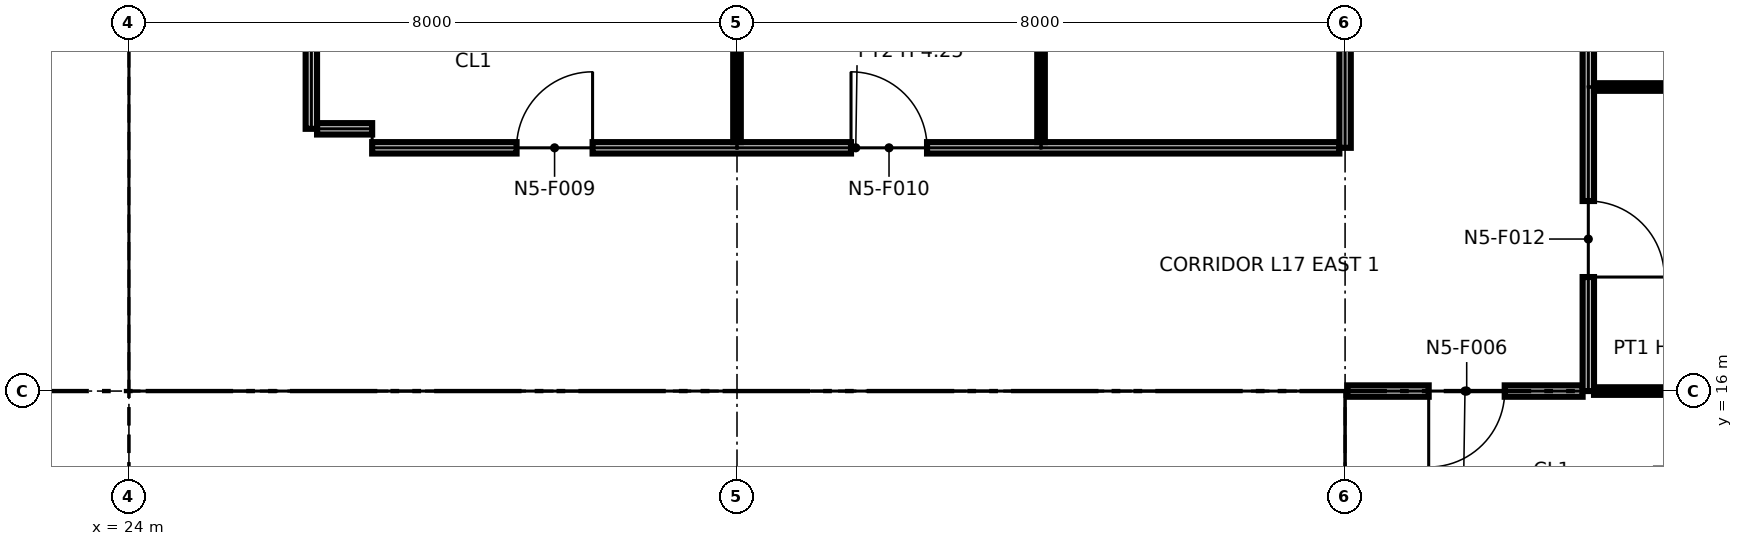
"""IFC4 building model, lengths in metres.
Left out: names, types, materials, properties, quantities, classifications, styles, units other than length and angle.
Written with IfcOpenShell. Run it as: python <this file> out.ifc"""

import sys

from ifc_helpers import new_model, si_unit, direction, frame, frame_2d, origin, origin_2d, place, context, subcontext, project, spatial, polyline, rectangle, i_section, outline, extrude, element, fill, save


model = new_model("IFC4")
c1 = context("Model", 3, precision=1e-05, world=origin(), true_north=direction((0.0, 1.0)))
c2 = subcontext(c1, "Body", "Model", "MODEL_VIEW")
j1 = project(units=[si_unit("LENGTHUNIT", "METRE"), si_unit("PLANEANGLEUNIT", "RADIAN")], contexts=[c1])
p1 = place(None, origin())
s1 = spatial("IfcSite", under=j1, at=p1, CompositionType="ELEMENT")
p2 = place(p1, origin())
s2 = spatial("IfcBuilding", under=s1, at=p2, CompositionType="ELEMENT")
p3 = place(p2, frame((0.0, 0.0, 92.0)))
s3 = spatial("IfcBuildingStorey", under=s2, at=p3, CompositionType="ELEMENT", Elevation=92.0)
p4 = place(p3, frame((24.0, 16.0, 0.0), z_axis=(0.0, 0.0, 1.0), x_axis=(1.0, 0.0, 0.0)))
e1 = element("IfcColumn", 1, at=p4, inside=s3, PredefinedType="COLUMN", context=c2, shape_type="SweptSolid", body=[
    extrude(i_section(OverallWidth=0.411, OverallDepth=0.434, WebThickness=0.036, FlangeThickness=0.057, at=origin_2d()), origin(), (0.0, 0.0, 1.0), 4.25),
])
for number, where, z_axis, x_axis in (
    (2, (32.0, 16.0, 0.0), (0.0, 0.0, 1.0), (1.0, 0.0, 0.0)),
    (3, (40.0, 16.0, 0.0), (0.0, 0.0, 1.0), (1.0, 0.0, 0.0)),
):
    element("IfcColumn", number, at=place(p3, frame(where, z_axis=z_axis, x_axis=x_axis)), inside=s3, PredefinedType="COLUMN", context=c2, shape_type="SweptSolid", body=[
        extrude(i_section(OverallWidth=0.406, OverallDepth=0.417, WebThickness=0.03, FlangeThickness=0.048, at=origin_2d()), origin(), (0.0, 0.0, 1.0), 4.25),
    ])
p5 = place(p3, frame((8.85, 19.9, 0.0), z_axis=(0.0, 0.0, 1.0), x_axis=(1.0, 0.0, 0.0)))
e4 = element("IfcWall", 4, at=p5, inside=s3, PredefinedType="PARTITIONING", context=c2, shape_type="SweptSolid", body=[
    extrude(outline(polyline([(0.0, 0.0), (14.3, 0.0), (14.3, 3.789), (7.27, 3.789), (7.269, 3.632), (7.031, 3.632), (7.031, 4.25), (0.0, 4.25), (0.0, 0.0)])), frame((0.0, 0.1, 0.0), z_axis=(0.0, -1.0, 0.0), x_axis=(1.0, 0.0, 0.0)), (0.0, 0.0, 1.0), 0.2),
])
p6 = place(p5, frame((6.35, 0.0, 0.0)))
e5 = element("IfcOpeningElement", 5, at=p6, cuts=e4, PredefinedType="OPENING", context=c2, shape_type="SweptSolid", body=[
    extrude(rectangle(XDim=0.9, YDim=2.1, at=frame_2d((0.45, 1.05))), frame((0.0, 0.11, 0.0), z_axis=(0.0, -1.0, 0.0), x_axis=(1.0, 0.0, 0.0)), (0.0, 0.0, 1.0), 0.22),
])
p7 = place(p5, frame((9.0, 0.0, 0.0)))
e6 = element("IfcOpeningElement", 6, at=p7, cuts=e4, PredefinedType="OPENING", context=c2, shape_type="SweptSolid", body=[
    extrude(rectangle(XDim=0.9, YDim=2.1, at=frame_2d((0.45, 1.05))), frame((0.0, 0.11, 0.0), z_axis=(0.0, -1.0, 0.0), x_axis=(1.0, 0.0, 0.0)), (0.0, 0.0, 1.0), 0.22),
])
p8 = place(p5, frame((11.35, 0.0, 0.0)))
e7 = element("IfcOpeningElement", 7, at=p8, cuts=e4, PredefinedType="OPENING", context=c2, shape_type="SweptSolid", body=[
    extrude(rectangle(XDim=1.0, YDim=2.1, at=frame_2d((0.5, 1.05))), frame((0.0, 0.11, 0.0), z_axis=(0.0, -1.0, 0.0), x_axis=(1.0, 0.0, 0.0)), (0.0, 0.0, 1.0), 0.22),
])
p9 = place(p5, frame((13.125, 0.0, 0.0)))
e8 = element("IfcOpeningElement", 8, at=p9, cuts=e4, PredefinedType="OPENING", context=c2, shape_type="SweptSolid", body=[
    extrude(rectangle(XDim=0.9, YDim=2.1, at=frame_2d((0.45, 1.05))), frame((0.0, 0.11, 0.0), z_axis=(0.0, -1.0, 0.0), x_axis=(1.0, 0.0, 0.0)), (0.0, 0.0, 1.0), 0.22),
])
p10 = place(p3, frame((16.219, 16.0, 0.0), z_axis=(0.0, 0.0, 1.0), x_axis=(1.0, 0.0, 0.0)))
e9 = element("IfcWall", 9, at=p10, inside=s3, PredefinedType="PARTITIONING", context=c2, shape_type="SweptSolid", body=[
    extrude(rectangle(XDim=6.931, YDim=0.6, at=frame_2d((3.466, 0.0))), origin(), (0.0, 0.0, 1.0), 3.632),
])
p11 = place(p10, frame((6.631, 0.0, 0.0), z_axis=(0.0, 0.0, 1.0), x_axis=(-1.0, 0.0, 0.0)))
e10 = element("IfcOpeningElement", 10, at=p11, cuts=e9, PredefinedType="OPENING", context=c2, shape_type="SweptSolid", body=[
    extrude(rectangle(XDim=0.7, YDim=2.1, at=frame_2d((0.35, 1.05))), frame((0.0, 0.31, 0.0), z_axis=(0.0, -1.0, 0.0), x_axis=(1.0, 0.0, 0.0)), (0.0, 0.0, 1.0), 0.62),
])
p12 = place(p3, frame((23.25, 8.85, 0.0), z_axis=(0.0, 0.0, 1.0), x_axis=(0.0, 1.0, 0.0)))
e11 = element("IfcWall", 11, at=p12, inside=s3, PredefinedType="PARTITIONING", context=c2, shape_type="SweptSolid", body=[
    extrude(outline(polyline([(0.0, 0.0), (14.3, 0.0), (14.3, 4.25), (11.231, 4.25), (11.23, 3.789), (11.07, 3.789), (11.069, 4.25), (7.27, 4.25), (7.269, 3.632), (7.031, 3.632), (7.031, 4.25), (1.231, 4.25), (1.23, 3.789), (1.07, 3.789), (1.069, 4.25), (0.0, 4.25), (0.0, 0.0)])), frame((0.0, 0.1, 0.0), z_axis=(0.0, -1.0, 0.0), x_axis=(1.0, 0.0, 0.0)), (0.0, 0.0, 1.0), 0.2),
])
p13 = place(p12, frame((8.3, 0.0, 0.0)))
e12 = element("IfcOpeningElement", 12, at=p13, cuts=e11, PredefinedType="OPENING", context=c2, shape_type="SweptSolid", body=[
    extrude(rectangle(XDim=1.8, YDim=2.1, at=frame_2d((0.9, 1.05))), frame((0.0, 0.11, 0.0), z_axis=(0.0, -1.0, 0.0), x_axis=(1.0, 0.0, 0.0)), (0.0, 0.0, 1.0), 0.22),
])
p14 = place(p3, frame((24.75, 8.85, 0.0), z_axis=(0.0, 0.0, 1.0), x_axis=(0.0, 1.0, 0.0)))
e13 = element("IfcWall", 13, at=p14, inside=s3, PredefinedType="PARTITIONING", context=c2, shape_type="SweptSolid", body=[
    extrude(outline(polyline([(0.0, 0.0), (6.3, 0.0), (6.3, 4.25), (3.231, 4.25), (3.23, 3.789), (3.07, 3.789), (3.069, 4.25), (0.0, 4.25), (0.0, 0.0)])), frame((0.0, 0.1, 0.0), z_axis=(0.0, -1.0, 0.0), x_axis=(1.0, 0.0, 0.0)), (0.0, 0.0, 1.0), 0.2),
])
p15 = place(p3, frame((24.65, 15.25, 0.0), z_axis=(0.0, 0.0, 1.0), x_axis=(1.0, 0.0, 0.0)))
e14 = element("IfcWall", 14, at=p15, inside=s3, PredefinedType="PARTITIONING", context=c2, shape_type="SweptSolid", body=[
    extrude(outline(polyline([(0.0, 0.0), (14.7, 0.0), (14.7, 4.25), (7.469, 4.25), (7.469, 3.632), (7.231, 3.632), (7.23, 4.25), (0.0, 4.25), (0.0, 0.0)])), frame((0.0, 0.1, 0.0), z_axis=(0.0, -1.0, 0.0), x_axis=(1.0, 0.0, 0.0)), (0.0, 0.0, 1.0), 0.2),
])
p16 = place(p15, frame((2.85, 0.0, 0.0)))
e15 = element("IfcOpeningElement", 15, at=p16, cuts=e14, PredefinedType="OPENING", context=c2, shape_type="SweptSolid", body=[
    extrude(rectangle(XDim=1.8, YDim=2.1, at=frame_2d((0.9, 1.05))), frame((0.0, 0.11, 0.0), z_axis=(0.0, -1.0, 0.0), x_axis=(1.0, 0.0, 0.0)), (0.0, 0.0, 1.0), 0.22),
])
p17 = place(p15, frame((9.95, 0.0, 0.0), z_axis=(0.0, 0.0, 1.0), x_axis=(-1.0, 0.0, 0.0)))
e16 = element("IfcOpeningElement", 16, at=p17, cuts=e14, PredefinedType="OPENING", context=c2, shape_type="SweptSolid", body=[
    extrude(rectangle(XDim=1.4, YDim=2.1, at=frame_2d((0.7, 1.05))), frame((0.0, 0.11, 0.0), z_axis=(0.0, -1.0, 0.0), x_axis=(1.0, 0.0, 0.0)), (0.0, 0.0, 1.0), 0.22),
])
p18 = place(p15, frame((13.4, 0.0, 0.0), z_axis=(0.0, 0.0, 1.0), x_axis=(-1.0, 0.0, 0.0)))
e17 = element("IfcOpeningElement", 17, at=p18, cuts=e14, PredefinedType="OPENING", context=c2, shape_type="SweptSolid", body=[
    extrude(rectangle(XDim=1.4, YDim=2.1, at=frame_2d((0.7, 1.05))), frame((0.0, 0.11, 0.0), z_axis=(0.0, -1.0, 0.0), x_axis=(1.0, 0.0, 0.0)), (0.0, 0.0, 1.0), 0.22),
])
p19 = place(p3, frame((32.0, 13.2, 0.0), z_axis=(0.0, 0.0, 1.0), x_axis=(0.0, 1.0, 0.0)))
e18 = element("IfcWall", 18, at=p19, inside=s3, PredefinedType="PARTITIONING", context=c2, shape_type="SweptSolid", body=[
    extrude(rectangle(XDim=1.95, YDim=0.6, at=frame_2d((0.975, 0.0))), origin(), (0.0, 0.0, 1.0), 3.632),
])
for number, where, z_axis, x_axis in (
    (19, (35.6, 8.85, 0.0), (0.0, 0.0, 1.0), (0.0, 1.0, 0.0)),
    (20, (39.25, 8.85, 0.0), (0.0, 0.0, 1.0), (0.0, 1.0, 0.0)),
):
    element("IfcWall", number, at=place(p3, frame(where, z_axis=z_axis, x_axis=x_axis)), inside=s3, PredefinedType="PARTITIONING", context=c2, shape_type="SweptSolid", body=[
        extrude(rectangle(XDim=6.3, YDim=0.2, at=frame_2d((3.15, 0.0))), origin(), (0.0, 0.0, 1.0), 4.25),
    ])
p20 = place(p3, frame((40.03, 16.0, 0.0), z_axis=(0.0, 0.0, 1.0), x_axis=(1.0, 0.0, 0.0)))
e21 = element("IfcWall", 21, at=p20, inside=s3, PredefinedType="PARTITIONING", context=c2, shape_type="SweptSolid", body=[
    extrude(rectangle(XDim=3.095, YDim=0.15, at=frame_2d((1.547, 0.0))), origin(), (0.0, 0.0, 1.0), 3.47),
])
p21 = place(p20, frame((2.07, 0.0, 0.0), z_axis=(0.0, 0.0, 1.0), x_axis=(-1.0, 0.0, 0.0)))
e22 = element("IfcOpeningElement", 22, at=p21, cuts=e21, PredefinedType="OPENING", context=c2, shape_type="SweptSolid", body=[
    extrude(rectangle(XDim=1.0, YDim=2.1, at=frame_2d((0.5, 1.05))), frame((0.0, 0.085, 0.0), z_axis=(0.0, -1.0, 0.0), x_axis=(1.0, 0.0, 0.0)), (0.0, 0.0, 1.0), 0.17),
])
p22 = place(p3, frame((43.275, 16.0, 0.0), z_axis=(0.0, 0.0, 1.0), x_axis=(1.0, 0.0, 0.0)))
e23 = element("IfcWall", 23, at=p22, inside=s3, PredefinedType="PARTITIONING", context=c2, shape_type="SweptSolid", body=[
    extrude(rectangle(XDim=1.895, YDim=0.1, at=frame_2d((0.948, 0.0))), origin(), (0.0, 0.0, 1.0), 3.47),
])
p23 = place(p3, frame((43.2, 16.0, 0.0), z_axis=(0.0, 0.0, 1.0), x_axis=(0.0, 1.0, 0.0)))
e24 = element("IfcWall", 24, at=p23, inside=s3, PredefinedType="PARTITIONING", context=c2, shape_type="SweptSolid", body=[
    extrude(outline(polyline([(0.0, 0.0), (27.125, 0.0), (27.125, 4.25), (24.3, 4.25), (24.298, 3.47), (23.702, 3.47), (23.7, 4.25), (20.3, 4.25), (20.298, 3.47), (19.702, 3.47), (19.7, 4.25), (16.3, 4.25), (16.298, 3.47), (15.702, 3.47), (15.7, 4.25), (12.3, 4.25), (12.298, 3.47), (11.702, 3.47), (11.7, 4.25), (8.3, 4.25), (8.298, 3.47), (7.702, 3.47), (7.7, 4.25), (4.3, 4.25), (4.298, 3.47), (3.702, 3.47), (3.7, 4.25), (0.0, 4.25), (0.0, 0.0)])), frame((0.0, 0.075, 0.0), z_axis=(0.0, -1.0, 0.0), x_axis=(1.0, 0.0, 0.0)), (0.0, 0.0, 1.0), 0.15),
])
p24 = place(p23, frame((2.5, 0.0, 0.0), z_axis=(0.0, 0.0, 1.0), x_axis=(-1.0, 0.0, 0.0)))
e25 = element("IfcOpeningElement", 25, at=p24, cuts=e24, PredefinedType="OPENING", context=c2, shape_type="SweptSolid", body=[
    extrude(rectangle(XDim=1.0, YDim=2.1, at=frame_2d((0.5, 1.05))), frame((0.0, 0.085, 0.0), z_axis=(0.0, -1.0, 0.0), x_axis=(1.0, 0.0, 0.0)), (0.0, 0.0, 1.0), 0.17),
])
p25 = place(p23, frame((12.5, 0.0, 0.0), z_axis=(0.0, 0.0, 1.0), x_axis=(-1.0, 0.0, 0.0)))
e26 = element("IfcOpeningElement", 26, at=p25, cuts=e24, PredefinedType="OPENING", context=c2, shape_type="SweptSolid", body=[
    extrude(rectangle(XDim=1.0, YDim=2.1, at=frame_2d((0.5, 1.05))), frame((0.0, 0.085, 0.0), z_axis=(0.0, -1.0, 0.0), x_axis=(1.0, 0.0, 0.0)), (0.0, 0.0, 1.0), 0.17),
])
p26 = place(p23, frame((18.5, 0.0, 0.0), z_axis=(0.0, 0.0, 1.0), x_axis=(-1.0, 0.0, 0.0)))
e27 = element("IfcOpeningElement", 27, at=p26, cuts=e24, PredefinedType="OPENING", context=c2, shape_type="SweptSolid", body=[
    extrude(rectangle(XDim=1.0, YDim=2.1, at=frame_2d((0.5, 1.05))), frame((0.0, 0.085, 0.0), z_axis=(0.0, -1.0, 0.0), x_axis=(1.0, 0.0, 0.0)), (0.0, 0.0, 1.0), 0.17),
])
p27 = place(p23, frame((22.5, 0.0, 0.0), z_axis=(0.0, 0.0, 1.0), x_axis=(-1.0, 0.0, 0.0)))
e28 = element("IfcOpeningElement", 28, at=p27, cuts=e24, PredefinedType="OPENING", context=c2, shape_type="SweptSolid", body=[
    extrude(rectangle(XDim=1.0, YDim=2.1, at=frame_2d((0.5, 1.05))), frame((0.0, 0.085, 0.0), z_axis=(0.0, -1.0, 0.0), x_axis=(1.0, 0.0, 0.0)), (0.0, 0.0, 1.0), 0.17),
])
p28 = place(p23, frame((26.1, 0.0, 0.0), z_axis=(0.0, 0.0, 1.0), x_axis=(-1.0, 0.0, 0.0)))
e29 = element("IfcOpeningElement", 29, at=p28, cuts=e24, PredefinedType="OPENING", context=c2, shape_type="SweptSolid", body=[
    extrude(rectangle(XDim=1.0, YDim=2.1, at=frame_2d((0.5, 1.05))), frame((0.0, 0.085, 0.0), z_axis=(0.0, -1.0, 0.0), x_axis=(1.0, 0.0, 0.0)), (0.0, 0.0, 1.0), 0.17),
])
p29 = place(p3, frame((27.2, 19.2, 0.0), z_axis=(0.0, 0.0, 1.0), x_axis=(1.0, 0.0, 0.0)))
e30 = element("IfcWall", 30, at=p29, inside=s3, PredefinedType="PARTITIONING", context=c2, shape_type="SweptSolid", body=[
    extrude(rectangle(XDim=12.725, YDim=0.15, at=frame_2d((6.363, 0.0))), origin(), (0.0, 0.0, 1.0), 4.25),
])
p30 = place(p29, frame((1.9, 0.0, 0.0)))
e31 = element("IfcOpeningElement", 31, at=p30, cuts=e30, PredefinedType="OPENING", context=c2, shape_type="SweptSolid", body=[
    extrude(rectangle(XDim=1.0, YDim=2.1, at=frame_2d((0.5, 1.05))), frame((0.0, 0.085, 0.0), z_axis=(0.0, -1.0, 0.0), x_axis=(1.0, 0.0, 0.0)), (0.0, 0.0, 1.0), 0.17),
])
p31 = place(p29, frame((6.3, 0.0, 0.0)))
e32 = element("IfcOpeningElement", 32, at=p31, cuts=e30, PredefinedType="OPENING", context=c2, shape_type="SweptSolid", body=[
    extrude(rectangle(XDim=1.0, YDim=2.1, at=frame_2d((0.5, 1.05))), frame((0.0, 0.085, 0.0), z_axis=(0.0, -1.0, 0.0), x_axis=(1.0, 0.0, 0.0)), (0.0, 0.0, 1.0), 0.17),
])
p32 = place(p3, frame((32.0, 19.275, 0.0), z_axis=(0.0, 0.0, 1.0), x_axis=(0.0, 1.0, 0.0)))
e33 = element("IfcWall", 33, at=p32, inside=s3, PredefinedType="PARTITIONING", context=c2, shape_type="SweptSolid", body=[
    extrude(rectangle(XDim=4.675, YDim=0.1, at=frame_2d((2.337, 0.0))), origin(), (0.0, 0.0, 1.0), 3.47),
])
p33 = place(p3, frame((36.0, 19.275, 0.0), z_axis=(0.0, 0.0, 1.0), x_axis=(0.0, 1.0, 0.0)))
e34 = element("IfcWall", 34, at=p33, inside=s3, PredefinedType="PARTITIONING", context=c2, shape_type="SweptSolid", body=[
    extrude(outline(polyline([(0.0, 0.0), (4.675, 0.0), (4.675, 4.25), (1.025, 4.25), (1.023, 3.47), (0.427, 3.47), (0.425, 4.25), (0.0, 4.25), (0.0, 0.0)])), frame((0.0, 0.05, 0.0), z_axis=(0.0, -1.0, 0.0), x_axis=(1.0, 0.0, 0.0)), (0.0, 0.0, 1.0), 0.1),
])
p34 = place(p3, frame((40.0, 19.2, 0.0), z_axis=(0.0, 0.0, 1.0), x_axis=(0.0, 1.0, 0.0)))
e35 = element("IfcWall", 35, at=p34, inside=s3, PredefinedType="PARTITIONING", context=c2, shape_type="SweptSolid", body=[
    extrude(rectangle(XDim=12.77, YDim=0.15, at=frame_2d((6.385, 0.0))), origin(), (0.0, 0.0, 1.0), 3.47),
])
p35 = place(p34, frame((1.9, 0.0, 0.0)))
e36 = element("IfcOpeningElement", 36, at=p35, cuts=e35, PredefinedType="OPENING", context=c2, shape_type="SweptSolid", body=[
    extrude(rectangle(XDim=1.0, YDim=2.1, at=frame_2d((0.5, 1.05))), frame((0.0, 0.085, 0.0), z_axis=(0.0, -1.0, 0.0), x_axis=(1.0, 0.0, 0.0)), (0.0, 0.0, 1.0), 0.17),
])
p36 = place(p34, frame((6.3, 0.0, 0.0)))
e37 = element("IfcOpeningElement", 37, at=p36, cuts=e35, PredefinedType="OPENING", context=c2, shape_type="SweptSolid", body=[
    extrude(rectangle(XDim=1.0, YDim=2.1, at=frame_2d((0.5, 1.05))), frame((0.0, 0.085, 0.0), z_axis=(0.0, -1.0, 0.0), x_axis=(1.0, 0.0, 0.0)), (0.0, 0.0, 1.0), 0.17),
])
p37 = place(p34, frame((10.3, 0.0, 0.0)))
e38 = element("IfcOpeningElement", 38, at=p37, cuts=e35, PredefinedType="OPENING", context=c2, shape_type="SweptSolid", body=[
    extrude(rectangle(XDim=1.0, YDim=2.1, at=frame_2d((0.5, 1.05))), frame((0.0, 0.085, 0.0), z_axis=(0.0, -1.0, 0.0), x_axis=(1.0, 0.0, 0.0)), (0.0, 0.0, 1.0), 0.17),
])
p38 = place(p3, frame((26.475, 19.45, 0.0), z_axis=(0.0, 0.0, 1.0), x_axis=(1.0, 0.0, 0.0)))
e39 = element("IfcWall", 39, at=p38, inside=s3, PredefinedType="PARTITIONING", context=c2, shape_type="SweptSolid", body=[
    extrude(rectangle(XDim=0.725, YDim=0.15, at=frame_2d((0.362, 0.0))), origin(), (0.0, 0.0, 1.0), 4.25),
])
p39 = place(p3, frame((26.4, 19.45, 0.0), z_axis=(0.0, 0.0, 1.0), x_axis=(0.0, 1.0, 0.0)))
e40 = element("IfcWall", 40, at=p39, inside=s3, PredefinedType="PARTITIONING", context=c2, shape_type="SweptSolid", body=[
    extrude(outline(polyline([(0.0, 0.0), (12.52, 0.0), (12.52, 4.25), (8.85, 4.25), (8.848, 3.47), (8.252, 3.47), (8.25, 4.25), (4.85, 4.25), (4.848, 3.47), (4.252, 3.47), (4.25, 4.25), (0.85, 4.25), (0.848, 3.47), (0.252, 3.47), (0.25, 4.25), (0.0, 4.25), (0.0, 0.0)])), frame((0.0, 0.075, 0.0), z_axis=(0.0, -1.0, 0.0), x_axis=(1.0, 0.0, 0.0)), (0.0, 0.0, 1.0), 0.15),
])
p40 = place(p39, frame((9.05, 0.0, 0.0), z_axis=(0.0, 0.0, 1.0), x_axis=(-1.0, 0.0, 0.0)))
e41 = element("IfcOpeningElement", 41, at=p40, cuts=e40, PredefinedType="OPENING", context=c2, shape_type="SweptSolid", body=[
    extrude(rectangle(XDim=1.0, YDim=2.1, at=frame_2d((0.5, 1.05))), frame((0.0, 0.085, 0.0), z_axis=(0.0, -1.0, 0.0), x_axis=(1.0, 0.0, 0.0)), (0.0, 0.0, 1.0), 0.17),
])
p41 = place(p3, frame((43.275, 20.0, 0.0), z_axis=(0.0, 0.0, 1.0), x_axis=(1.0, 0.0, 0.0)))
e42 = element("IfcWall", 42, at=p41, inside=s3, PredefinedType="PARTITIONING", context=c2, shape_type="SweptSolid", body=[
    extrude(rectangle(XDim=4.595, YDim=0.1, at=frame_2d((2.298, 0.0))), origin(), (0.0, 0.0, 1.0), 3.47),
])
p42 = place(p13, origin())
e43 = element("IfcDoor", 43, at=p42, inside=s3, OperationType="DOUBLE_DOOR_SINGLE_SWING", PredefinedType="NOTDEFINED", context=c2, shape_type="SweptSolid", body=[
    extrude(rectangle(XDim=1.8, YDim=2.1, at=frame_2d((0.9, 1.05))), frame((0.0, 0.025, 0.0), z_axis=(0.0, -1.0, 0.0), x_axis=(1.0, 0.0, 0.0)), (0.0, 0.0, 1.0), 0.05),
])
fill(e12, e43)
p43 = place(p16, origin())
e44 = element("IfcDoor", 44, at=p43, inside=s3, OperationType="DOUBLE_DOOR_SINGLE_SWING", PredefinedType="NOTDEFINED", context=c2, shape_type="SweptSolid", body=[
    extrude(rectangle(XDim=1.8, YDim=2.1, at=frame_2d((0.9, 1.05))), frame((0.0, 0.025, 0.0), z_axis=(0.0, -1.0, 0.0), x_axis=(1.0, 0.0, 0.0)), (0.0, 0.0, 1.0), 0.05),
])
fill(e15, e44)
p44 = place(p17, origin())
e45 = element("IfcDoor", 45, at=p44, inside=s3, OperationType="DOUBLE_DOOR_SINGLE_SWING", PredefinedType="NOTDEFINED", context=c2, shape_type="SweptSolid", body=[
    extrude(rectangle(XDim=1.4, YDim=2.1, at=frame_2d((0.7, 1.05))), frame((0.0, 0.025, 0.0), z_axis=(0.0, -1.0, 0.0), x_axis=(1.0, 0.0, 0.0)), (0.0, 0.0, 1.0), 0.05),
])
fill(e16, e45)
p45 = place(p18, origin())
e46 = element("IfcDoor", 46, at=p45, inside=s3, OperationType="DOUBLE_DOOR_SINGLE_SWING", PredefinedType="NOTDEFINED", context=c2, shape_type="SweptSolid", body=[
    extrude(rectangle(XDim=1.4, YDim=2.1, at=frame_2d((0.7, 1.05))), frame((0.0, 0.025, 0.0), z_axis=(0.0, -1.0, 0.0), x_axis=(1.0, 0.0, 0.0)), (0.0, 0.0, 1.0), 0.05),
])
fill(e17, e46)
p46 = place(p21, origin())
e47 = element("IfcDoor", 47, at=p46, inside=s3, OperationType="SINGLE_SWING_RIGHT", PredefinedType="DOOR", context=c2, shape_type="SweptSolid", body=[
    extrude(rectangle(XDim=1.0, YDim=2.1, at=frame_2d((0.5, 1.05))), frame((0.0, 0.025, 0.0), z_axis=(0.0, -1.0, 0.0), x_axis=(1.0, 0.0, 0.0)), (0.0, 0.0, 1.0), 0.05),
])
fill(e22, e47)
p47 = place(p30, origin())
e48 = element("IfcDoor", 48, at=p47, inside=s3, OperationType="SINGLE_SWING_RIGHT", PredefinedType="DOOR", context=c2, shape_type="SweptSolid", body=[
    extrude(rectangle(XDim=1.0, YDim=2.1, at=frame_2d((0.5, 1.05))), frame((0.0, 0.025, 0.0), z_axis=(0.0, -1.0, 0.0), x_axis=(1.0, 0.0, 0.0)), (0.0, 0.0, 1.0), 0.05),
])
fill(e31, e48)
p48 = place(p31, origin())
e49 = element("IfcDoor", 49, at=p48, inside=s3, OperationType="SINGLE_SWING_LEFT", PredefinedType="DOOR", context=c2, shape_type="SweptSolid", body=[
    extrude(rectangle(XDim=1.0, YDim=2.1, at=frame_2d((0.5, 1.05))), frame((0.0, 0.025, 0.0), z_axis=(0.0, -1.0, 0.0), x_axis=(1.0, 0.0, 0.0)), (0.0, 0.0, 1.0), 0.05),
])
fill(e32, e49)
p49 = place(p24, origin())
e50 = element("IfcDoor", 50, at=p49, inside=s3, OperationType="SINGLE_SWING_RIGHT", PredefinedType="DOOR", context=c2, shape_type="SweptSolid", body=[
    extrude(rectangle(XDim=1.0, YDim=2.1, at=frame_2d((0.5, 1.05))), frame((0.0, 0.025, 0.0), z_axis=(0.0, -1.0, 0.0), x_axis=(1.0, 0.0, 0.0)), (0.0, 0.0, 1.0), 0.05),
])
fill(e25, e50)
save(model, sys.argv[1])
